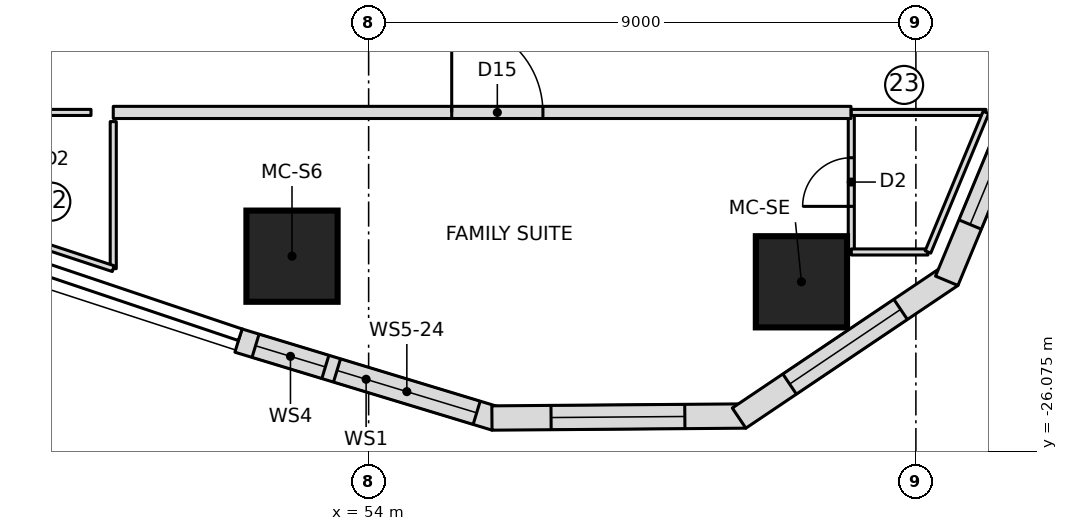
"""IFC4 building model, lengths in metres.
Left out: names, types, materials, properties, quantities, classifications, styles, units other than length and angle.
Written with IfcOpenShell. Run it as: python <this file> out.ifc"""

import sys

from ifc_helpers import new_model, si_unit, direction, frame, frame_2d, origin, origin_2d, place, context, subcontext, project, spatial, polyline, rectangle, outline, extrude, element, fill, save


model = new_model("IFC4")
c1 = context("Model", 3, precision=1e-05, world=origin(), true_north=direction((0.0, 1.0)))
c2 = subcontext(c1, "Body", "Model", "MODEL_VIEW")
j1 = project(units=[si_unit("LENGTHUNIT", "METRE"), si_unit("PLANEANGLEUNIT", "RADIAN")], contexts=[c1])
p1 = place(None, origin())
s1 = spatial("IfcSite", under=j1, at=p1, CompositionType="ELEMENT")
p2 = place(p1, origin())
s2 = spatial("IfcBuilding", under=s1, at=p2, CompositionType="ELEMENT")
p3 = place(p2, frame((0.0, 0.0, 130.2)))
s3 = spatial("IfcBuildingStorey", under=s2, at=p3, CompositionType="ELEMENT", Elevation=130.2)
for number, where, z_axis, x_axis in (
    (1, (52.74, -22.869, 0.0), (0.0, 0.0, 1.0), (1.0, 0.0, 0.0)),
    (2, (61.117, -23.291, 0.0), (0.0, 0.0, 1.0), (1.0, 0.0, 0.0)),
):
    element("IfcColumn", number, at=place(p3, frame(where, z_axis=z_axis, x_axis=x_axis)), inside=s3, PredefinedType="COLUMN", context=c2, shape_type="SweptSolid", body=[
        extrude(rectangle(XDim=1.5, YDim=1.5, at=origin_2d()), origin(), (0.0, 0.0, 1.0), 3.55),
    ])
p4 = place(p3, frame((51.859, -24.257, 0.0), z_axis=(0.0, 0.0, 1.0), x_axis=(0.956964488344, -0.290205044837, 0.0)))
e3 = element("IfcWall", 3, at=p4, inside=s3, PredefinedType="NOTDEFINED", context=c2, shape_type="SweptSolid", body=[
    extrude(outline(polyline([(0.0, -0.2), (4.418, -0.2), (4.357, 0.2), (0.0, 0.2), (0.0, -0.2)])), origin(), (0.0, 0.0, 1.0), 3.25),
])
p5 = place(p4, frame((0.294, 0.0, 0.9)))
e4 = element("IfcOpeningElement", 4, at=p5, cuts=e3, PredefinedType="OPENING", context=c2, shape_type="SweptSolid", body=[
    extrude(rectangle(XDim=1.2, YDim=1.8, at=frame_2d((0.6, 0.9))), frame((0.0, 0.21, 0.0), z_axis=(0.0, -1.0, 0.0), x_axis=(1.0, 0.0, 0.0)), (0.0, 0.0, 1.0), 0.42),
])
p6 = place(p4, frame((1.694, 0.0, 0.9)))
e5 = element("IfcOpeningElement", 5, at=p6, cuts=e3, PredefinedType="OPENING", context=c2, shape_type="SweptSolid", body=[
    extrude(rectangle(XDim=2.4, YDim=1.8, at=frame_2d((1.2, 0.9))), frame((0.0, 0.21, 0.0), z_axis=(0.0, -1.0, 0.0), x_axis=(1.0, 0.0, 0.0)), (0.0, 0.0, 1.0), 0.42),
])
p7 = place(p3, frame((56.058, -25.531, 0.0), z_axis=(0.0, 0.0, 1.0), x_axis=(0.99996933771, 0.007830941131, 0.0)))
e6 = element("IfcWall", 6, at=p7, inside=s3, PredefinedType="NOTDEFINED", context=c2, shape_type="SweptSolid", body=[
    extrude(outline(polyline([(-0.031, -0.2), (4.145, -0.2), (4.024, 0.2), (0.031, 0.2), (-0.031, -0.2)])), origin(), (0.0, 0.0, 1.0), 3.25),
])
p8 = place(p7, frame((0.942, 0.0, 0.6)))
e7 = element("IfcOpeningElement", 7, at=p8, cuts=e6, PredefinedType="OPENING", context=c2, shape_type="SweptSolid", body=[
    extrude(outline(polyline([(0.0, 1.35), (0.084, 1.771), (0.322, 2.128), (0.679, 2.366), (1.1, 2.45), (1.521, 2.366), (1.878, 2.128), (2.116, 1.771), (2.2, 1.35), (2.2, 1.1), (2.116, 0.679), (1.878, 0.322), (1.521, 0.084), (1.1, 0.0), (0.679, 0.084), (0.322, 0.322), (0.084, 0.679), (0.0, 1.1), (0.0, 1.35)])), frame((0.0, 0.21, 0.0), z_axis=(0.0, -1.0, 0.0), x_axis=(1.0, 0.0, 0.0)), (0.0, 0.0, 1.0), 0.42),
])
p9 = place(p3, frame((60.142, -25.499, 0.0), z_axis=(0.0, 0.0, 1.0), x_axis=(0.829642062482, 0.558295663749, 0.0)))
e8 = element("IfcWall", 8, at=p9, inside=s3, PredefinedType="NOTDEFINED", context=c2, shape_type="SweptSolid", body=[
    extrude(outline(polyline([(-0.06, -0.2), (4.144, -0.2), (4.024, 0.2), (0.06, 0.2), (-0.06, -0.2)])), origin(), (0.0, 0.0, 1.0), 3.25),
])
p10 = place(p9, frame((0.942, 0.0, 0.6)))
e9 = element("IfcOpeningElement", 9, at=p10, cuts=e8, PredefinedType="OPENING", context=c2, shape_type="SweptSolid", body=[
    extrude(outline(polyline([(0.0, 1.35), (0.084, 1.771), (0.322, 2.128), (0.679, 2.366), (1.1, 2.45), (1.521, 2.366), (1.878, 2.128), (2.116, 1.771), (2.2, 1.35), (2.2, 1.1), (2.116, 0.679), (1.878, 0.322), (1.521, 0.084), (1.1, 0.0), (0.679, 0.084), (0.322, 0.322), (0.084, 0.679), (0.0, 1.1), (0.0, 1.35)])), frame((0.0, 0.21, 0.0), z_axis=(0.0, -1.0, 0.0), x_axis=(1.0, 0.0, 0.0)), (0.0, 0.0, 1.0), 0.42),
])
p11 = place(p3, frame((63.53, -23.219, 0.0), z_axis=(0.0, 0.0, 1.0), x_axis=(0.383817293519, 0.923409056267, 0.0)))
e10 = element("IfcWall", 10, at=p11, inside=s3, PredefinedType="NOTDEFINED", context=c2, shape_type="SweptSolid", body=[
    extrude(outline(polyline([(-0.06, -0.2), (4.115, -0.2), (4.054, 0.2), (0.06, 0.2), (-0.06, -0.2)])), origin(), (0.0, 0.0, 1.0), 3.25),
])
p12 = place(p11, frame((0.942, 0.0, 0.6)))
e11 = element("IfcOpeningElement", 11, at=p12, cuts=e10, PredefinedType="OPENING", context=c2, shape_type="SweptSolid", body=[
    extrude(outline(polyline([(0.0, 1.35), (0.084, 1.771), (0.322, 2.128), (0.679, 2.366), (1.1, 2.45), (1.521, 2.366), (1.878, 2.128), (2.116, 1.771), (2.2, 1.35), (2.2, 1.1), (2.116, 0.679), (1.878, 0.322), (1.521, 0.084), (1.1, 0.0), (0.679, 0.084), (0.322, 0.322), (0.084, 0.679), (0.0, 1.1), (0.0, 1.35)])), frame((0.0, 0.21, 0.0), z_axis=(0.0, -1.0, 0.0), x_axis=(1.0, 0.0, 0.0)), (0.0, 0.0, 1.0), 0.42),
])
p13 = place(p3, frame((61.938, -22.8, 0.0), z_axis=(0.0, 0.0, 1.0), x_axis=(0.0, 1.0, 0.0)))
e12 = element("IfcWall", 12, at=p13, inside=s3, PredefinedType="PARTITIONING", context=c2, shape_type="SweptSolid", body=[
    extrude(rectangle(XDim=2.3, YDim=0.1, at=frame_2d((1.15, 0.0))), origin(), (0.0, 0.0, 1.0), 3.25),
])
p14 = place(p13, frame((0.75, 0.0, 0.0)))
e13 = element("IfcOpeningElement", 13, at=p14, cuts=e12, PredefinedType="OPENING", context=c2, shape_type="SweptSolid", body=[
    extrude(rectangle(XDim=0.8, YDim=2.1, at=frame_2d((0.4, 1.05))), frame((0.0, 0.06, 0.0), z_axis=(0.0, -1.0, 0.0), x_axis=(1.0, 0.0, 0.0)), (0.0, 0.0, 1.0), 0.12),
])
p15 = place(p3, frame((63.198, -22.8, 0.0), z_axis=(0.0, 0.0, 1.0), x_axis=(-1.0, 0.0, 0.0)))
e14 = element("IfcWall", 14, at=p15, inside=s3, PredefinedType="PARTITIONING", context=c2, shape_type="SweptSolid", body=[
    extrude(rectangle(XDim=1.261, YDim=0.1, at=frame_2d((0.63, 0.0))), origin(), (0.0, 0.0, 1.0), 3.25),
])
p16 = place(p3, frame((49.8, -20.505, 0.0), z_axis=(0.0, 0.0, 1.0), x_axis=(1.0, 0.0, 0.0)))
e15 = element("IfcWall", 15, at=p16, inside=s3, PredefinedType="PARTITIONING", context=c2, shape_type="SweptSolid", body=[
    extrude(rectangle(XDim=12.133, YDim=0.2, at=frame_2d((6.066, 0.0))), origin(), (0.0, 0.0, 1.0), 3.25),
])
p17 = place(p16, frame((5.566, 0.0, 0.0)))
e16 = element("IfcOpeningElement", 16, at=p17, cuts=e15, PredefinedType="OPENING", context=c2, shape_type="SweptSolid", body=[
    extrude(rectangle(XDim=1.5, YDim=2.1, at=frame_2d((0.75, 1.05))), frame((0.0, 0.11, 0.0), z_axis=(0.0, -1.0, 0.0), x_axis=(1.0, 0.0, 0.0)), (0.0, 0.0, 1.0), 0.22),
])
p18 = place(p3, frame((61.938, -20.505, 0.0), z_axis=(0.0, 0.0, 1.0), x_axis=(1.0, 0.0, 0.0)))
e17 = element("IfcWall", 17, at=p18, inside=s3, PredefinedType="PARTITIONING", context=c2, shape_type="SweptSolid", body=[
    extrude(rectangle(XDim=2.215, YDim=0.1, at=frame_2d((1.107, 0.0))), origin(), (0.0, 0.0, 1.0), 3.25),
])
p19 = place(p3, frame((64.152, -20.505, 0.0), z_axis=(0.0, 0.0, 1.0), x_axis=(-0.383855043906, -0.923393364319, 0.0)))
e18 = element("IfcWall", 18, at=p19, inside=s3, PredefinedType="PARTITIONING", context=c2, shape_type="SweptSolid", body=[
    extrude(rectangle(XDim=2.486, YDim=0.1, at=frame_2d((1.243, 0.0))), origin(), (0.0, 0.0, 1.0), 3.25),
])
p20 = place(p3, frame((48.299, -20.505, 0.0), z_axis=(0.0, 0.0, 1.0), x_axis=(1.0, 0.0, 0.0)))
e19 = element("IfcWall", 19, at=p20, inside=s3, PredefinedType="PARTITIONING", context=c2, shape_type="SweptSolid", body=[
    extrude(rectangle(XDim=1.135, YDim=0.1, at=frame_2d((0.568, 0.0))), origin(), (0.0, 0.0, 1.0), 3.25),
])
p21 = place(p3, frame((49.8, -20.656, 0.0), z_axis=(0.0, 0.0, 1.0), x_axis=(0.0, -1.0, 0.0)))
e20 = element("IfcWall", 20, at=p21, inside=s3, PredefinedType="PARTITIONING", context=c2, shape_type="SweptSolid", body=[
    extrude(rectangle(XDim=2.418, YDim=0.1, at=frame_2d((1.209, 0.0))), origin(), (0.0, 0.0, 1.0), 3.25),
])
p22 = place(p3, frame((49.8, -23.074, 0.0), z_axis=(0.0, 0.0, 1.0), x_axis=(-0.949844078437, 0.312723882455, 0.0)))
e21 = element("IfcWall", 21, at=p22, inside=s3, PredefinedType="PARTITIONING", context=c2, shape_type="SweptSolid", body=[
    extrude(rectangle(XDim=2.51, YDim=0.1, at=frame_2d((1.255, 0.0))), origin(), (0.0, 0.0, 1.0), 3.25),
])
p23 = place(p5, origin())
e22 = element("IfcWindow", 22, at=p23, inside=s3, PartitioningType="SINGLE_PANEL", PredefinedType="WINDOW", context=c2, shape_type="SweptSolid", body=[
    extrude(rectangle(XDim=1.2, YDim=1.8, at=frame_2d((0.6, 0.9))), frame((0.0, 0.17, 0.0), z_axis=(0.0, -1.0, 0.0), x_axis=(1.0, 0.0, 0.0)), (0.0, 0.0, 1.0), 0.06),
])
fill(e4, e22)
p24 = place(p6, origin())
e23 = element("IfcWindow", 23, at=p24, inside=s3, PartitioningType="SINGLE_PANEL", PredefinedType="WINDOW", context=c2, shape_type="SweptSolid", body=[
    extrude(rectangle(XDim=2.4, YDim=1.8, at=frame_2d((1.2, 0.9))), frame((0.0, 0.17, 0.0), z_axis=(0.0, -1.0, 0.0), x_axis=(1.0, 0.0, 0.0)), (0.0, 0.0, 1.0), 0.06),
])
fill(e5, e23)
p25 = place(p8, origin())
e24 = element("IfcWindow", 24, at=p25, inside=s3, PartitioningType="SINGLE_PANEL", PredefinedType="WINDOW", context=c2, shape_type="SweptSolid", body=[
    extrude(outline(polyline([(0.0, 1.35), (0.084, 1.771), (0.322, 2.128), (0.679, 2.366), (1.1, 2.45), (1.521, 2.366), (1.878, 2.128), (2.116, 1.771), (2.2, 1.35), (2.2, 1.1), (2.116, 0.679), (1.878, 0.322), (1.521, 0.084), (1.1, 0.0), (0.679, 0.084), (0.322, 0.322), (0.084, 0.679), (0.0, 1.1), (0.0, 1.35)])), frame((0.0, 0.17, 0.0), z_axis=(0.0, -1.0, 0.0), x_axis=(1.0, 0.0, 0.0)), (0.0, 0.0, 1.0), 0.06),
])
fill(e7, e24)
p26 = place(p10, origin())
e25 = element("IfcWindow", 25, at=p26, inside=s3, PartitioningType="SINGLE_PANEL", PredefinedType="WINDOW", context=c2, shape_type="SweptSolid", body=[
    extrude(outline(polyline([(0.0, 1.35), (0.084, 1.771), (0.322, 2.128), (0.679, 2.366), (1.1, 2.45), (1.521, 2.366), (1.878, 2.128), (2.116, 1.771), (2.2, 1.35), (2.2, 1.1), (2.116, 0.679), (1.878, 0.322), (1.521, 0.084), (1.1, 0.0), (0.679, 0.084), (0.322, 0.322), (0.084, 0.679), (0.0, 1.1), (0.0, 1.35)])), frame((0.0, 0.17, 0.0), z_axis=(0.0, -1.0, 0.0), x_axis=(1.0, 0.0, 0.0)), (0.0, 0.0, 1.0), 0.06),
])
fill(e9, e25)
p27 = place(p12, origin())
e26 = element("IfcWindow", 26, at=p27, inside=s3, PartitioningType="SINGLE_PANEL", PredefinedType="WINDOW", context=c2, shape_type="SweptSolid", body=[
    extrude(outline(polyline([(0.0, 1.35), (0.084, 1.771), (0.322, 2.128), (0.679, 2.366), (1.1, 2.45), (1.521, 2.366), (1.878, 2.128), (2.116, 1.771), (2.2, 1.35), (2.2, 1.1), (2.116, 0.679), (1.878, 0.322), (1.521, 0.084), (1.1, 0.0), (0.679, 0.084), (0.322, 0.322), (0.084, 0.679), (0.0, 1.1), (0.0, 1.35)])), frame((0.0, 0.17, 0.0), z_axis=(0.0, -1.0, 0.0), x_axis=(1.0, 0.0, 0.0)), (0.0, 0.0, 1.0), 0.06),
])
fill(e11, e26)
p28 = place(p14, origin())
e27 = element("IfcDoor", 27, at=p28, inside=s3, OperationType="SINGLE_SWING_LEFT", PredefinedType="DOOR", context=c2, shape_type="SweptSolid", body=[
    extrude(rectangle(XDim=0.8, YDim=2.1, at=frame_2d((0.4, 1.05))), frame((0.0, 0.025, 0.0), z_axis=(0.0, -1.0, 0.0), x_axis=(1.0, 0.0, 0.0)), (0.0, 0.0, 1.0), 0.05),
])
fill(e13, e27)
p29 = place(p17, origin())
e28 = element("IfcDoor", 28, at=p29, inside=s3, OperationType="DOUBLE_DOOR_SINGLE_SWING", PredefinedType="DOOR", context=c2, shape_type="SweptSolid", body=[
    extrude(rectangle(XDim=1.5, YDim=2.1, at=frame_2d((0.75, 1.05))), frame((0.0, 0.025, 0.0), z_axis=(0.0, -1.0, 0.0), x_axis=(1.0, 0.0, 0.0)), (0.0, 0.0, 1.0), 0.05),
])
fill(e16, e28)
save(model, sys.argv[1])
